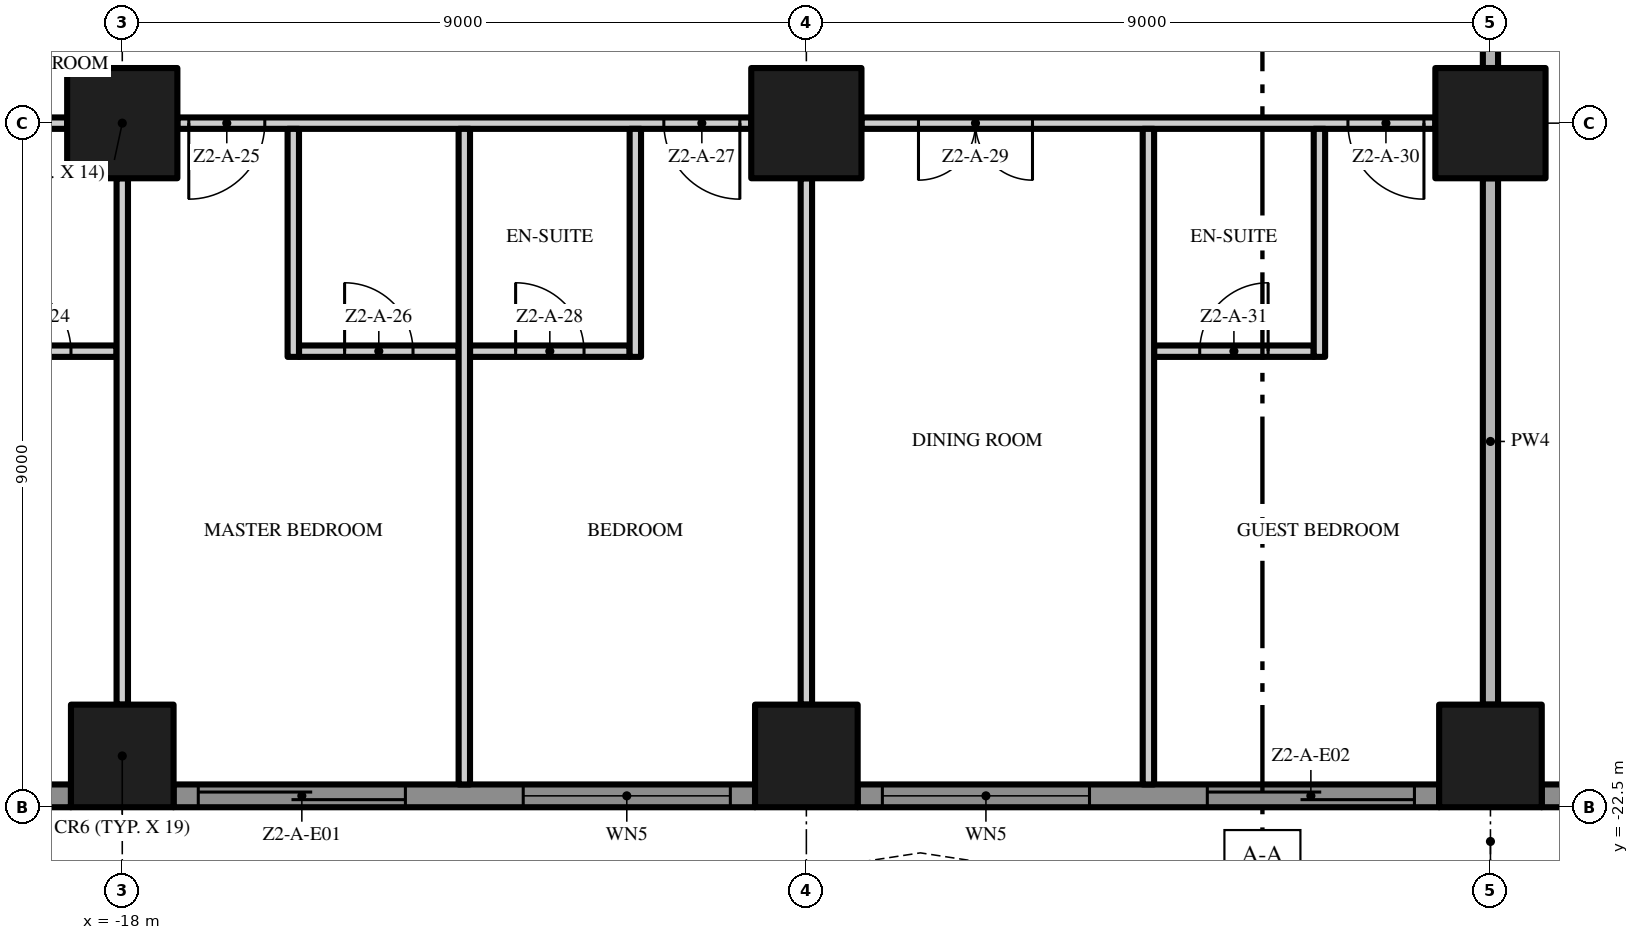
"""IFC4 building model, lengths in metres.
Left out: names, types, materials, properties, quantities, classifications, styles, units other than length and angle.
Written with IfcOpenShell. Run it as: python <this file> out.ifc"""

import sys

from ifc_helpers import new_model, si_unit, direction, frame, frame_2d, origin, origin_2d, place, context, subcontext, project, spatial, polyline, rectangle, outline, extrude, element, fill, save


model = new_model("IFC4")
c1 = context("Model", 3, precision=1e-05, world=origin(), true_north=direction((0.0, 1.0)))
c2 = subcontext(c1, "Body", "Model", "MODEL_VIEW")
j1 = project(units=[si_unit("LENGTHUNIT", "METRE"), si_unit("PLANEANGLEUNIT", "RADIAN")], contexts=[c1])
p1 = place(None, origin())
s1 = spatial("IfcSite", under=j1, at=p1, CompositionType="ELEMENT")
p2 = place(p1, origin())
s2 = spatial("IfcBuilding", under=s1, at=p2, CompositionType="ELEMENT")
p3 = place(p2, frame((0.0, 0.0, 69.4)))
s3 = spatial("IfcBuildingStorey", under=s2, at=p3, CompositionType="ELEMENT", Elevation=69.4)
p4 = place(p3, frame((-18.0, -13.5, 0.0), z_axis=(0.0, 0.0, 1.0), x_axis=(1.0, 0.0, 0.0)))
e1 = element("IfcColumn", 1, at=p4, inside=s3, PredefinedType="COLUMN", context=c2, shape_type="SweptSolid", body=[
    extrude(rectangle(XDim=1.45, YDim=1.45, at=origin_2d()), origin(), (0.0, 0.0, 1.0), 3.5),
])
p5 = place(p3, frame((-18.0, -21.825, 0.0), z_axis=(0.0, 0.0, 1.0), x_axis=(1.0, 0.0, 0.0)))
e2 = element("IfcColumn", 2, at=p5, inside=s3, PredefinedType="COLUMN", context=c2, shape_type="SweptSolid", body=[
    extrude(rectangle(XDim=1.35, YDim=1.35, at=origin_2d()), origin(), (0.0, 0.0, 1.0), 3.5),
])
p6 = place(p3, frame((-9.0, -13.5, 0.0), z_axis=(0.0, 0.0, 1.0), x_axis=(1.0, 0.0, 0.0)))
e3 = element("IfcColumn", 3, at=p6, inside=s3, PredefinedType="COLUMN", context=c2, shape_type="SweptSolid", body=[
    extrude(rectangle(XDim=1.45, YDim=1.45, at=origin_2d()), origin(), (0.0, 0.0, 1.0), 3.5),
])
p7 = place(p3, frame((-9.0, -21.825, 0.0), z_axis=(0.0, 0.0, 1.0), x_axis=(1.0, 0.0, 0.0)))
e4 = element("IfcColumn", 4, at=p7, inside=s3, PredefinedType="COLUMN", context=c2, shape_type="SweptSolid", body=[
    extrude(rectangle(XDim=1.35, YDim=1.35, at=origin_2d()), origin(), (0.0, 0.0, 1.0), 3.5),
])
p8 = place(p3, frame((0.0, -13.5, 0.0), z_axis=(0.0, 0.0, 1.0), x_axis=(1.0, 0.0, 0.0)))
e5 = element("IfcColumn", 5, at=p8, inside=s3, PredefinedType="COLUMN", context=c2, shape_type="SweptSolid", body=[
    extrude(rectangle(XDim=1.45, YDim=1.45, at=origin_2d()), origin(), (0.0, 0.0, 1.0), 3.5),
])
p9 = place(p3, frame((0.0, -21.825, 0.0), z_axis=(0.0, 0.0, 1.0), x_axis=(1.0, 0.0, 0.0)))
e6 = element("IfcColumn", 6, at=p9, inside=s3, PredefinedType="COLUMN", context=c2, shape_type="SweptSolid", body=[
    extrude(rectangle(XDim=1.35, YDim=1.35, at=origin_2d()), origin(), (0.0, 0.0, 1.0), 3.5),
])
p10 = place(p3, frame((-18.675, -22.35, 0.0), z_axis=(0.0, 0.0, 1.0), x_axis=(-1.0, 0.0, 0.0)))
e7 = element("IfcWall", 7, at=p10, inside=s3, PredefinedType="SOLIDWALL", context=c2, shape_type="SweptSolid", body=[
    extrude(rectangle(XDim=3.525, YDim=0.3, at=frame_2d((1.762, 0.0))), origin(), (0.0, 0.0, 1.0), 3.5),
])
p11 = place(p10, frame((0.325, 0.0, 0.45)))
e8 = element("IfcOpeningElement", 8, at=p11, cuts=e7, PredefinedType="OPENING", context=c2, shape_type="SweptSolid", body=[
    extrude(rectangle(XDim=2.725, YDim=2.65, at=frame_2d((1.363, 1.325))), frame((0.0, 0.16, 0.0), z_axis=(0.0, -1.0, 0.0), x_axis=(1.0, 0.0, 0.0)), (0.0, 0.0, 1.0), 0.32),
])
p12 = place(p3, frame((-9.675, -22.35, 0.0), z_axis=(0.0, 0.0, 1.0), x_axis=(-1.0, 0.0, 0.0)))
e9 = element("IfcWall", 9, at=p12, inside=s3, PredefinedType="SOLIDWALL", context=c2, shape_type="SweptSolid", body=[
    extrude(rectangle(XDim=7.65, YDim=0.3, at=frame_2d((3.825, 0.0))), origin(), (0.0, 0.0, 1.0), 3.5),
])
p13 = place(p12, frame((4.6, 0.0, 0.0)))
e10 = element("IfcOpeningElement", 10, at=p13, cuts=e9, PredefinedType="OPENING", context=c2, shape_type="SweptSolid", body=[
    extrude(rectangle(XDim=2.725, YDim=2.4, at=frame_2d((1.363, 1.2))), frame((0.0, 0.16, 0.0), z_axis=(0.0, -1.0, 0.0), x_axis=(1.0, 0.0, 0.0)), (0.0, 0.0, 1.0), 0.32),
])
p14 = place(p12, frame((0.325, 0.0, 0.45)))
e11 = element("IfcOpeningElement", 11, at=p14, cuts=e9, PredefinedType="OPENING", context=c2, shape_type="SweptSolid", body=[
    extrude(rectangle(XDim=2.725, YDim=2.65, at=frame_2d((1.363, 1.325))), frame((0.0, 0.16, 0.0), z_axis=(0.0, -1.0, 0.0), x_axis=(1.0, 0.0, 0.0)), (0.0, 0.0, 1.0), 0.32),
])
p15 = place(p3, frame((-0.675, -22.35, 0.0), z_axis=(0.0, 0.0, 1.0), x_axis=(-1.0, 0.0, 0.0)))
e12 = element("IfcWall", 12, at=p15, inside=s3, PredefinedType="SOLIDWALL", context=c2, shape_type="SweptSolid", body=[
    extrude(rectangle(XDim=7.65, YDim=0.3, at=frame_2d((3.825, 0.0))), origin(), (0.0, 0.0, 1.0), 3.5),
])
p16 = place(p15, frame((4.6, 0.0, 0.45)))
e13 = element("IfcOpeningElement", 13, at=p16, cuts=e12, PredefinedType="OPENING", context=c2, shape_type="SweptSolid", body=[
    extrude(rectangle(XDim=2.725, YDim=2.65, at=frame_2d((1.363, 1.325))), frame((0.0, 0.16, 0.0), z_axis=(0.0, -1.0, 0.0), x_axis=(1.0, 0.0, 0.0)), (0.0, 0.0, 1.0), 0.32),
])
p17 = place(p15, frame((0.325, 0.0, 0.0)))
e14 = element("IfcOpeningElement", 14, at=p17, cuts=e12, PredefinedType="OPENING", context=c2, shape_type="SweptSolid", body=[
    extrude(rectangle(XDim=2.725, YDim=2.4, at=frame_2d((1.363, 1.2))), frame((0.0, 0.16, 0.0), z_axis=(0.0, -1.0, 0.0), x_axis=(1.0, 0.0, 0.0)), (0.0, 0.0, 1.0), 0.32),
])
p18 = place(p3, frame((8.325, -22.35, 0.0), z_axis=(0.0, 0.0, 1.0), x_axis=(-1.0, 0.0, 0.0)))
e15 = element("IfcWall", 15, at=p18, inside=s3, PredefinedType="SOLIDWALL", context=c2, shape_type="SweptSolid", body=[
    extrude(rectangle(XDim=7.65, YDim=0.3, at=frame_2d((3.825, 0.0))), origin(), (0.0, 0.0, 1.0), 3.5),
])
p19 = place(p18, frame((4.6, 0.0, 0.0)))
e16 = element("IfcOpeningElement", 16, at=p19, cuts=e15, PredefinedType="OPENING", context=c2, shape_type="SweptSolid", body=[
    extrude(rectangle(XDim=2.725, YDim=2.4, at=frame_2d((1.363, 1.2))), frame((0.0, 0.16, 0.0), z_axis=(0.0, -1.0, 0.0), x_axis=(1.0, 0.0, 0.0)), (0.0, 0.0, 1.0), 0.32),
])
p20 = place(p18, frame((0.325, 0.0, 0.45)))
e17 = element("IfcOpeningElement", 17, at=p20, cuts=e15, PredefinedType="OPENING", context=c2, shape_type="SweptSolid", body=[
    extrude(rectangle(XDim=2.725, YDim=2.65, at=frame_2d((1.363, 1.325))), frame((0.0, 0.16, 0.0), z_axis=(0.0, -1.0, 0.0), x_axis=(1.0, 0.0, 0.0)), (0.0, 0.0, 1.0), 0.32),
])
p21 = place(p3, origin())
e18 = element("IfcWall", 18, at=p21, inside=s3, PredefinedType="USERDEFINED", context=c2, shape_type="SweptSolid", body=[
    extrude(outline(polyline([(-22.5, -23.1), (-21.0, -23.329), (-19.5, -23.929), (-18.0, -24.671), (-16.5, -25.271), (-15.0, -25.5), (-13.5, -25.271), (-12.0, -24.671), (-10.5, -23.929), (-9.0, -23.329), (-7.5, -23.1), (-6.0, -23.329), (-4.5, -23.929), (-3.0, -24.671), (-1.5, -25.271), (0.0, -25.5), (1.5, -25.271), (3.0, -24.671), (4.5, -23.929), (6.0, -23.329), (7.5, -23.1), (9.0, -23.329), (10.5, -23.929), (12.0, -24.671), (13.5, -25.271), (15.0, -25.5), (16.5, -25.271), (18.0, -24.671), (19.5, -23.929), (21.0, -23.329), (22.5, -23.1), (22.462, -22.853), (20.934, -23.086), (19.398, -23.701), (17.898, -24.442), (16.434, -25.028), (15.0, -25.247), (13.566, -25.028), (12.102, -24.442), (10.602, -23.701), (9.066, -23.086), (7.5, -22.847), (5.934, -23.086), (4.398, -23.701), (2.898, -24.442), (1.434, -25.028), (0.0, -25.247), (-1.434, -25.028), (-2.898, -24.442), (-4.398, -23.701), (-5.934, -23.086), (-7.5, -22.847), (-9.066, -23.086), (-10.602, -23.701), (-12.102, -24.442), (-13.566, -25.028), (-15.0, -25.247), (-16.434, -25.028), (-17.898, -24.442), (-19.398, -23.701), (-20.934, -23.086), (-22.462, -22.853), (-22.5, -23.1)])), origin(), (0.0, 0.0, 1.0), 0.9),
])
p22 = place(p3, frame((-20.175, -16.5, 0.0), z_axis=(0.0, 0.0, 1.0), x_axis=(1.0, 0.0, 0.0)))
e19 = element("IfcWall", 19, at=p22, inside=s3, PredefinedType="PARTITIONING", context=c2, shape_type="SweptSolid", body=[
    extrude(rectangle(XDim=2.1, YDim=0.15, at=frame_2d((1.05, 0.0))), origin(), (0.0, 0.0, 1.0), 3.5),
])
p23 = place(p22, frame((0.6, 0.0, 0.0)))
e20 = element("IfcOpeningElement", 20, at=p23, cuts=e19, PredefinedType="OPENING", context=c2, shape_type="SweptSolid", body=[
    extrude(rectangle(XDim=0.9, YDim=2.1, at=frame_2d((0.45, 1.05))), frame((0.0, 0.085, 0.0), z_axis=(0.0, -1.0, 0.0), x_axis=(1.0, 0.0, 0.0)), (0.0, 0.0, 1.0), 0.17),
])
p24 = place(p3, frame((-15.675, -16.5, 0.0), z_axis=(0.0, 0.0, 1.0), x_axis=(1.0, 0.0, 0.0)))
e21 = element("IfcWall", 21, at=p24, inside=s3, PredefinedType="PARTITIONING", context=c2, shape_type="SweptSolid", body=[
    extrude(rectangle(XDim=2.1, YDim=0.15, at=frame_2d((1.05, 0.0))), origin(), (0.0, 0.0, 1.0), 3.5),
])
p25 = place(p24, frame((0.6, 0.0, 0.0)))
e22 = element("IfcOpeningElement", 22, at=p25, cuts=e21, PredefinedType="OPENING", context=c2, shape_type="SweptSolid", body=[
    extrude(rectangle(XDim=0.9, YDim=2.1, at=frame_2d((0.45, 1.05))), frame((0.0, 0.085, 0.0), z_axis=(0.0, -1.0, 0.0), x_axis=(1.0, 0.0, 0.0)), (0.0, 0.0, 1.0), 0.17),
])
p26 = place(p3, frame((-13.425, -16.5, 0.0), z_axis=(0.0, 0.0, 1.0), x_axis=(1.0, 0.0, 0.0)))
e23 = element("IfcWall", 23, at=p26, inside=s3, PredefinedType="PARTITIONING", context=c2, shape_type="SweptSolid", body=[
    extrude(rectangle(XDim=2.1, YDim=0.15, at=frame_2d((1.05, 0.0))), origin(), (0.0, 0.0, 1.0), 3.5),
])
p27 = place(p26, frame((0.6, 0.0, 0.0)))
e24 = element("IfcOpeningElement", 24, at=p27, cuts=e23, PredefinedType="OPENING", context=c2, shape_type="SweptSolid", body=[
    extrude(rectangle(XDim=0.9, YDim=2.1, at=frame_2d((0.45, 1.05))), frame((0.0, 0.085, 0.0), z_axis=(0.0, -1.0, 0.0), x_axis=(1.0, 0.0, 0.0)), (0.0, 0.0, 1.0), 0.17),
])
p28 = place(p3, frame((-4.425, -16.5, 0.0), z_axis=(0.0, 0.0, 1.0), x_axis=(1.0, 0.0, 0.0)))
e25 = element("IfcWall", 25, at=p28, inside=s3, PredefinedType="PARTITIONING", context=c2, shape_type="SweptSolid", body=[
    extrude(rectangle(XDim=2.1, YDim=0.15, at=frame_2d((1.05, 0.0))), origin(), (0.0, 0.0, 1.0), 3.5),
])
p29 = place(p28, frame((0.6, 0.0, 0.0)))
e26 = element("IfcOpeningElement", 26, at=p29, cuts=e25, PredefinedType="OPENING", context=c2, shape_type="SweptSolid", body=[
    extrude(rectangle(XDim=0.9, YDim=2.1, at=frame_2d((0.45, 1.05))), frame((0.0, 0.085, 0.0), z_axis=(0.0, -1.0, 0.0), x_axis=(1.0, 0.0, 0.0)), (0.0, 0.0, 1.0), 0.17),
])
p30 = place(p3, frame((-18.725, -13.5, 0.0), z_axis=(0.0, 0.0, 1.0), x_axis=(-1.0, 0.0, 0.0)))
e27 = element("IfcWall", 27, at=p30, inside=s3, PredefinedType="PARTITIONING", context=c2, shape_type="SweptSolid", body=[
    extrude(rectangle(XDim=6.925, YDim=0.15, at=frame_2d((3.462, 0.0))), origin(), (0.0, 0.0, 1.0), 3.5),
])
p31 = place(p30, frame((4.025, 0.0, 0.0)))
e28 = element("IfcOpeningElement", 28, at=p31, cuts=e27, PredefinedType="OPENING", context=c2, shape_type="SweptSolid", body=[
    extrude(rectangle(XDim=1.8, YDim=2.4, at=frame_2d((0.9, 1.2))), frame((0.0, 0.085, 0.0), z_axis=(0.0, -1.0, 0.0), x_axis=(1.0, 0.0, 0.0)), (0.0, 0.0, 1.0), 0.17),
])
p32 = place(p3, frame((-9.725, -13.5, 0.0), z_axis=(0.0, 0.0, 1.0), x_axis=(-1.0, 0.0, 0.0)))
e29 = element("IfcWall", 29, at=p32, inside=s3, PredefinedType="PARTITIONING", context=c2, shape_type="SweptSolid", body=[
    extrude(rectangle(XDim=7.55, YDim=0.15, at=frame_2d((3.775, 0.0))), origin(), (0.0, 0.0, 1.0), 3.5),
])
p33 = place(p32, frame((6.4, 0.0, 0.0)))
e30 = element("IfcOpeningElement", 30, at=p33, cuts=e29, PredefinedType="OPENING", context=c2, shape_type="SweptSolid", body=[
    extrude(rectangle(XDim=1.0, YDim=2.4, at=frame_2d((0.5, 1.2))), frame((0.0, 0.085, 0.0), z_axis=(0.0, -1.0, 0.0), x_axis=(1.0, 0.0, 0.0)), (0.0, 0.0, 1.0), 0.17),
])
p34 = place(p32, frame((0.15, 0.0, 0.0)))
e31 = element("IfcOpeningElement", 31, at=p34, cuts=e29, PredefinedType="OPENING", context=c2, shape_type="SweptSolid", body=[
    extrude(rectangle(XDim=1.0, YDim=2.4, at=frame_2d((0.5, 1.2))), frame((0.0, 0.085, 0.0), z_axis=(0.0, -1.0, 0.0), x_axis=(1.0, 0.0, 0.0)), (0.0, 0.0, 1.0), 0.17),
])
p35 = place(p3, frame((-0.725, -13.5, 0.0), z_axis=(0.0, 0.0, 1.0), x_axis=(-1.0, 0.0, 0.0)))
e32 = element("IfcWall", 32, at=p35, inside=s3, PredefinedType="PARTITIONING", context=c2, shape_type="SweptSolid", body=[
    extrude(rectangle(XDim=7.55, YDim=0.15, at=frame_2d((3.775, 0.0))), origin(), (0.0, 0.0, 1.0), 3.5),
])
p36 = place(p35, frame((5.3, 0.0, 0.0)))
e33 = element("IfcOpeningElement", 33, at=p36, cuts=e32, PredefinedType="OPENING", context=c2, shape_type="SweptSolid", body=[
    extrude(rectangle(XDim=1.5, YDim=2.4, at=frame_2d((0.75, 1.2))), frame((0.0, 0.085, 0.0), z_axis=(0.0, -1.0, 0.0), x_axis=(1.0, 0.0, 0.0)), (0.0, 0.0, 1.0), 0.17),
])
p37 = place(p35, frame((0.15, 0.0, 0.0)))
e34 = element("IfcOpeningElement", 34, at=p37, cuts=e32, PredefinedType="OPENING", context=c2, shape_type="SweptSolid", body=[
    extrude(rectangle(XDim=1.0, YDim=2.4, at=frame_2d((0.5, 1.2))), frame((0.0, 0.085, 0.0), z_axis=(0.0, -1.0, 0.0), x_axis=(1.0, 0.0, 0.0)), (0.0, 0.0, 1.0), 0.17),
])
p38 = place(p3, frame((-18.0, -21.15, 0.0), z_axis=(0.0, 0.0, 1.0), x_axis=(0.0, 1.0, 0.0)))
e35 = element("IfcWall", 35, at=p38, inside=s3, PredefinedType="PARTITIONING", context=c2, shape_type="SweptSolid", body=[
    extrude(rectangle(XDim=6.925, YDim=0.15, at=frame_2d((3.462, 0.0))), origin(), (0.0, 0.0, 1.0), 3.5),
])
p39 = place(p3, frame((-15.75, -16.575, 0.0), z_axis=(0.0, 0.0, 1.0), x_axis=(0.0, 1.0, 0.0)))
e36 = element("IfcWall", 36, at=p39, inside=s3, PredefinedType="PARTITIONING", context=c2, shape_type="SweptSolid", body=[
    extrude(rectangle(XDim=3.0, YDim=0.15, at=frame_2d((1.5, 0.0))), origin(), (0.0, 0.0, 1.0), 3.5),
])
p40 = place(p3, frame((-13.5, -22.2, 0.0), z_axis=(0.0, 0.0, 1.0), x_axis=(0.0, 1.0, 0.0)))
e37 = element("IfcWall", 37, at=p40, inside=s3, PredefinedType="PARTITIONING", context=c2, shape_type="SweptSolid", body=[
    extrude(rectangle(XDim=8.625, YDim=0.15, at=frame_2d((4.312, 0.0))), origin(), (0.0, 0.0, 1.0), 3.5),
])
p41 = place(p3, frame((-11.25, -16.575, 0.0), z_axis=(0.0, 0.0, 1.0), x_axis=(0.0, 1.0, 0.0)))
e38 = element("IfcWall", 38, at=p41, inside=s3, PredefinedType="PARTITIONING", context=c2, shape_type="SweptSolid", body=[
    extrude(rectangle(XDim=3.0, YDim=0.15, at=frame_2d((1.5, 0.0))), origin(), (0.0, 0.0, 1.0), 3.5),
])
p42 = place(p3, frame((-9.0, -21.15, 0.0), z_axis=(0.0, 0.0, 1.0), x_axis=(0.0, 1.0, 0.0)))
e39 = element("IfcWall", 39, at=p42, inside=s3, PredefinedType="PARTITIONING", context=c2, shape_type="SweptSolid", body=[
    extrude(rectangle(XDim=6.925, YDim=0.15, at=frame_2d((3.462, 0.0))), origin(), (0.0, 0.0, 1.0), 3.5),
])
p43 = place(p3, frame((-4.5, -22.2, 0.0), z_axis=(0.0, 0.0, 1.0), x_axis=(0.0, 1.0, 0.0)))
e40 = element("IfcWall", 40, at=p43, inside=s3, PredefinedType="PARTITIONING", context=c2, shape_type="SweptSolid", body=[
    extrude(rectangle(XDim=8.625, YDim=0.15, at=frame_2d((4.312, 0.0))), origin(), (0.0, 0.0, 1.0), 3.5),
])
p44 = place(p3, frame((-2.25, -16.575, 0.0), z_axis=(0.0, 0.0, 1.0), x_axis=(0.0, 1.0, 0.0)))
e41 = element("IfcWall", 41, at=p44, inside=s3, PredefinedType="PARTITIONING", context=c2, shape_type="SweptSolid", body=[
    extrude(rectangle(XDim=3.0, YDim=0.15, at=frame_2d((1.5, 0.0))), origin(), (0.0, 0.0, 1.0), 3.5),
])
p45 = place(p3, frame((0.0, -21.15, 0.0), z_axis=(0.0, 0.0, 1.0), x_axis=(0.0, 1.0, 0.0)))
e42 = element("IfcWall", 42, at=p45, inside=s3, PredefinedType="PARTITIONING", context=c2, shape_type="SweptSolid", body=[
    extrude(rectangle(XDim=6.925, YDim=0.2, at=frame_2d((3.462, 0.0))), origin(), (0.0, 0.0, 1.0), 3.5),
])
p46 = place(p3, frame((0.0, -12.775, 0.0), z_axis=(0.0, 0.0, 1.0), x_axis=(0.0, 1.0, 0.0)))
e43 = element("IfcWall", 43, at=p46, inside=s3, PredefinedType="PARTITIONING", context=c2, shape_type="SweptSolid", body=[
    extrude(rectangle(XDim=7.55, YDim=0.2, at=frame_2d((3.775, 0.0))), origin(), (0.0, 0.0, 1.0), 3.5),
])
p47 = place(p13, origin())
e44 = element("IfcDoor", 44, at=p47, inside=s3, OperationType="SINGLE_SWING_LEFT", PredefinedType="DOOR", context=c2, shape_type="SweptSolid", body=[
    extrude(rectangle(XDim=2.725, YDim=2.4, at=frame_2d((1.363, 1.2))), frame((0.0, 0.025, 0.0), z_axis=(0.0, -1.0, 0.0), x_axis=(1.0, 0.0, 0.0)), (0.0, 0.0, 1.0), 0.05),
])
fill(e10, e44)
p48 = place(p14, origin())
e45 = element("IfcWindow", 45, at=p48, inside=s3, PartitioningType="SINGLE_PANEL", PredefinedType="WINDOW", context=c2, shape_type="SweptSolid", body=[
    extrude(rectangle(XDim=2.725, YDim=2.65, at=frame_2d((1.363, 1.325))), frame((0.0, 0.03, 0.0), z_axis=(0.0, -1.0, 0.0), x_axis=(1.0, 0.0, 0.0)), (0.0, 0.0, 1.0), 0.06),
])
fill(e11, e45)
p49 = place(p16, origin())
e46 = element("IfcWindow", 46, at=p49, inside=s3, PartitioningType="SINGLE_PANEL", PredefinedType="WINDOW", context=c2, shape_type="SweptSolid", body=[
    extrude(rectangle(XDim=2.725, YDim=2.65, at=frame_2d((1.363, 1.325))), frame((0.0, 0.03, 0.0), z_axis=(0.0, -1.0, 0.0), x_axis=(1.0, 0.0, 0.0)), (0.0, 0.0, 1.0), 0.06),
])
fill(e13, e46)
p50 = place(p17, origin())
e47 = element("IfcDoor", 47, at=p50, inside=s3, OperationType="SINGLE_SWING_LEFT", PredefinedType="DOOR", context=c2, shape_type="SweptSolid", body=[
    extrude(rectangle(XDim=2.725, YDim=2.4, at=frame_2d((1.363, 1.2))), frame((0.0, 0.025, 0.0), z_axis=(0.0, -1.0, 0.0), x_axis=(1.0, 0.0, 0.0)), (0.0, 0.0, 1.0), 0.05),
])
fill(e14, e47)
p51 = place(p23, origin())
e48 = element("IfcDoor", 48, at=p51, inside=s3, OperationType="SINGLE_SWING_LEFT", PredefinedType="DOOR", context=c2, shape_type="SweptSolid", body=[
    extrude(rectangle(XDim=0.9, YDim=2.1, at=frame_2d((0.45, 1.05))), frame((0.0, 0.025, 0.0), z_axis=(0.0, -1.0, 0.0), x_axis=(1.0, 0.0, 0.0)), (0.0, 0.0, 1.0), 0.05),
])
fill(e20, e48)
p52 = place(p33, origin())
e49 = element("IfcDoor", 49, at=p52, inside=s3, OperationType="SINGLE_SWING_RIGHT", PredefinedType="DOOR", context=c2, shape_type="SweptSolid", body=[
    extrude(rectangle(XDim=1.0, YDim=2.4, at=frame_2d((0.5, 1.2))), frame((0.0, 0.025, 0.0), z_axis=(0.0, -1.0, 0.0), x_axis=(1.0, 0.0, 0.0)), (0.0, 0.0, 1.0), 0.05),
])
fill(e30, e49)
p53 = place(p25, origin())
e50 = element("IfcDoor", 50, at=p53, inside=s3, OperationType="SINGLE_SWING_LEFT", PredefinedType="DOOR", context=c2, shape_type="SweptSolid", body=[
    extrude(rectangle(XDim=0.9, YDim=2.1, at=frame_2d((0.45, 1.05))), frame((0.0, 0.025, 0.0), z_axis=(0.0, -1.0, 0.0), x_axis=(1.0, 0.0, 0.0)), (0.0, 0.0, 1.0), 0.05),
])
fill(e22, e50)
p54 = place(p34, origin())
e51 = element("IfcDoor", 51, at=p54, inside=s3, OperationType="SINGLE_SWING_LEFT", PredefinedType="DOOR", context=c2, shape_type="SweptSolid", body=[
    extrude(rectangle(XDim=1.0, YDim=2.4, at=frame_2d((0.5, 1.2))), frame((0.0, 0.025, 0.0), z_axis=(0.0, -1.0, 0.0), x_axis=(1.0, 0.0, 0.0)), (0.0, 0.0, 1.0), 0.05),
])
fill(e31, e51)
p55 = place(p27, origin())
e52 = element("IfcDoor", 52, at=p55, inside=s3, OperationType="SINGLE_SWING_LEFT", PredefinedType="DOOR", context=c2, shape_type="SweptSolid", body=[
    extrude(rectangle(XDim=0.9, YDim=2.1, at=frame_2d((0.45, 1.05))), frame((0.0, 0.025, 0.0), z_axis=(0.0, -1.0, 0.0), x_axis=(1.0, 0.0, 0.0)), (0.0, 0.0, 1.0), 0.05),
])
fill(e24, e52)
p56 = place(p36, origin())
e53 = element("IfcDoor", 53, at=p56, inside=s3, OperationType="DOUBLE_DOOR_SINGLE_SWING", PredefinedType="DOOR", context=c2, shape_type="SweptSolid", body=[
    extrude(rectangle(XDim=1.5, YDim=2.4, at=frame_2d((0.75, 1.2))), frame((0.0, 0.025, 0.0), z_axis=(0.0, -1.0, 0.0), x_axis=(1.0, 0.0, 0.0)), (0.0, 0.0, 1.0), 0.05),
])
fill(e33, e53)
p57 = place(p37, origin())
e54 = element("IfcDoor", 54, at=p57, inside=s3, OperationType="SINGLE_SWING_LEFT", PredefinedType="DOOR", context=c2, shape_type="SweptSolid", body=[
    extrude(rectangle(XDim=1.0, YDim=2.4, at=frame_2d((0.5, 1.2))), frame((0.0, 0.025, 0.0), z_axis=(0.0, -1.0, 0.0), x_axis=(1.0, 0.0, 0.0)), (0.0, 0.0, 1.0), 0.05),
])
fill(e34, e54)
p58 = place(p29, origin())
e55 = element("IfcDoor", 55, at=p58, inside=s3, OperationType="SINGLE_SWING_RIGHT", PredefinedType="DOOR", context=c2, shape_type="SweptSolid", body=[
    extrude(rectangle(XDim=0.9, YDim=2.1, at=frame_2d((0.45, 1.05))), frame((0.0, 0.025, 0.0), z_axis=(0.0, -1.0, 0.0), x_axis=(1.0, 0.0, 0.0)), (0.0, 0.0, 1.0), 0.05),
])
fill(e26, e55)
save(model, sys.argv[1])
